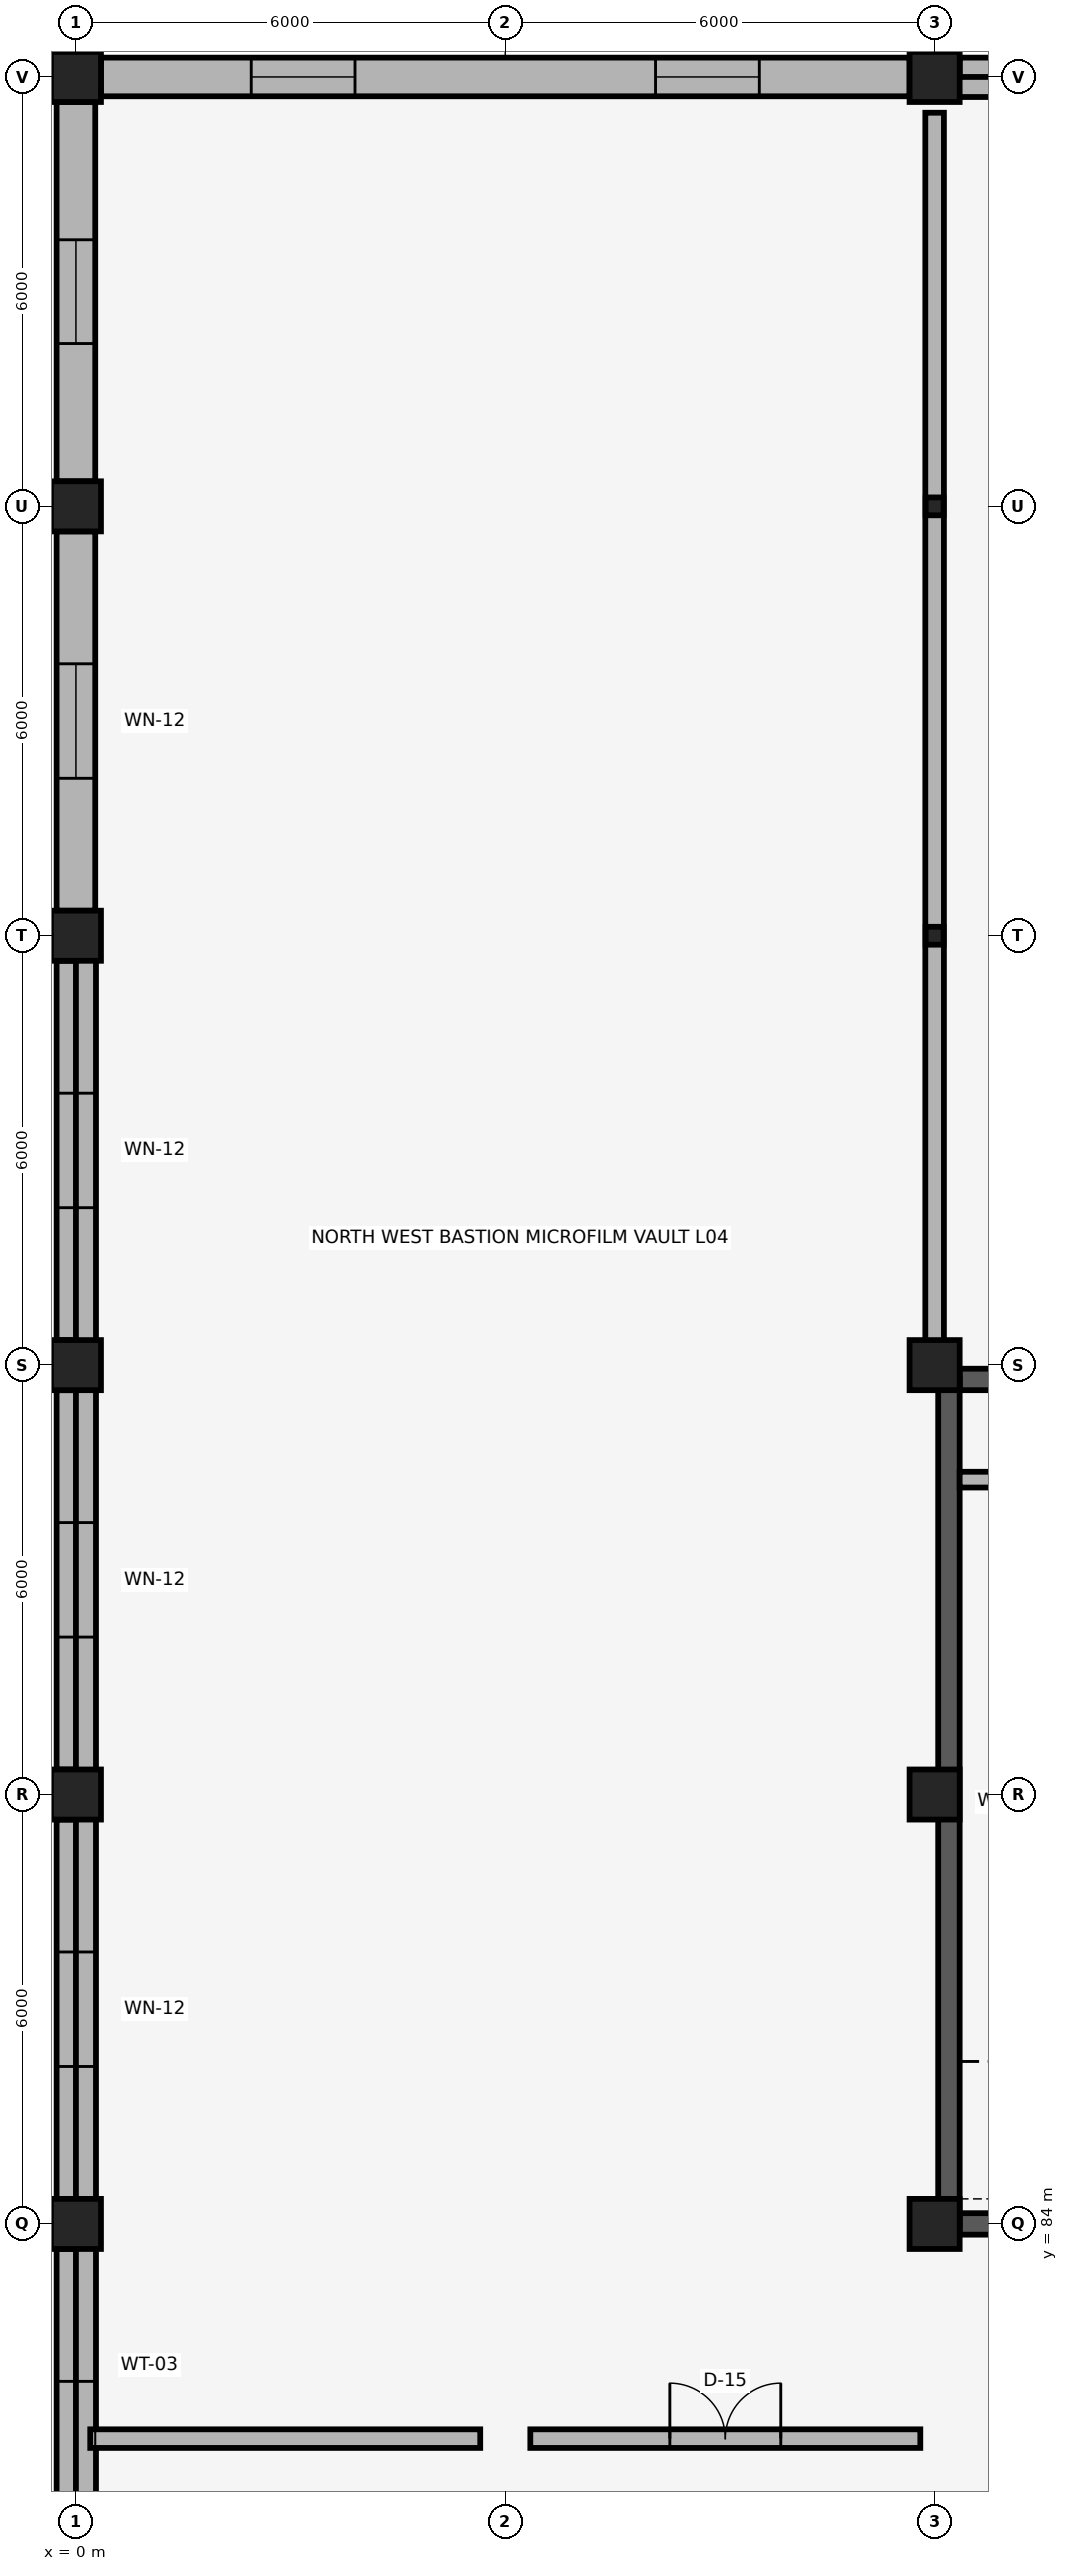
"""IFC4 building model, lengths in metres.
Left out: names, types, materials, properties, quantities, classifications, styles, units other than length and angle.
Written with IfcOpenShell. Run it as: python <this file> out.ifc"""

import sys

from ifc_helpers import new_model, si_unit, direction, frame, frame_2d, origin, origin_2d, place, context, subcontext, project, spatial, rectangle, i_section, extrude, element, fill, save


model = new_model("IFC4")
c1 = context("Model", 3, precision=1e-05, world=origin(), true_north=direction((0.0, 1.0)))
c2 = subcontext(c1, "Body", "Model", "MODEL_VIEW")
j1 = project(units=[si_unit("LENGTHUNIT", "METRE"), si_unit("PLANEANGLEUNIT", "RADIAN")], contexts=[c1])
p1 = place(None, origin())
s1 = spatial("IfcSite", under=j1, at=p1, CompositionType="ELEMENT")
p2 = place(p1, origin())
s2 = spatial("IfcBuilding", under=s1, at=p2, CompositionType="ELEMENT")
p3 = place(p2, frame((0.0, 0.0, 16.5)))
s3 = spatial("IfcBuildingStorey", under=s2, at=p3, CompositionType="ELEMENT", Elevation=16.5)
for number, where, z_axis, x_axis in (
    (1, (0.0, 84.0, 0.0), (0.0, 0.0, 1.0), (1.0, 0.0, 0.0)),
    (2, (12.0, 84.0, 0.0), (0.0, 0.0, 1.0), (1.0, 0.0, 0.0)),
    (3, (0.0, 90.0, 0.0), (0.0, 0.0, 1.0), (1.0, 0.0, 0.0)),
    (4, (12.0, 90.0, 0.0), (0.0, 0.0, 1.0), (1.0, 0.0, 0.0)),
    (5, (0.0, 96.0, 0.0), (0.0, 0.0, 1.0), (1.0, 0.0, 0.0)),
    (6, (12.0, 96.0, 0.0), (0.0, 0.0, 1.0), (1.0, 0.0, 0.0)),
    (7, (0.0, 102.0, 0.0), (0.0, 0.0, 1.0), (1.0, 0.0, 0.0)),
):
    element("IfcColumn", number, at=place(p3, frame(where, z_axis=z_axis, x_axis=x_axis)), inside=s3, PredefinedType="COLUMN", context=c2, shape_type="SweptSolid", body=[
        extrude(rectangle(XDim=0.7, YDim=0.7, at=origin_2d()), origin(), (0.0, 0.0, 1.0), 4.0),
    ])
p4 = place(p3, frame((12.0, 102.0, 0.0), z_axis=(0.0, 0.0, 1.0), x_axis=(1.0, 0.0, 0.0)))
e8 = element("IfcColumn", 8, at=p4, inside=s3, PredefinedType="COLUMN", context=c2, shape_type="SweptSolid", body=[
    extrude(i_section(OverallWidth=0.25, OverallDepth=0.25, WebThickness=0.009, FlangeThickness=0.014, FilletRadius=0.016, at=origin_2d()), origin(), (0.0, 0.0, 1.0), 4.0),
])
p5 = place(p3, frame((0.0, 108.0, 0.0), z_axis=(0.0, 0.0, 1.0), x_axis=(1.0, 0.0, 0.0)))
e9 = element("IfcColumn", 9, at=p5, inside=s3, PredefinedType="COLUMN", context=c2, shape_type="SweptSolid", body=[
    extrude(rectangle(XDim=0.7, YDim=0.7, at=origin_2d()), origin(), (0.0, 0.0, 1.0), 4.0),
])
p6 = place(p3, frame((12.0, 108.0, 0.0), z_axis=(0.0, 0.0, 1.0), x_axis=(1.0, 0.0, 0.0)))
e10 = element("IfcColumn", 10, at=p6, inside=s3, PredefinedType="COLUMN", context=c2, shape_type="SweptSolid", body=[
    extrude(i_section(OverallWidth=0.25, OverallDepth=0.25, WebThickness=0.009, FlangeThickness=0.014, FilletRadius=0.016, at=origin_2d()), origin(), (0.0, 0.0, 1.0), 4.0),
])
for number, where, z_axis, x_axis in (
    (11, (0.0, 114.0, 0.0), (0.0, 0.0, 1.0), (1.0, 0.0, 0.0)),
    (12, (12.0, 114.0, 0.0), (0.0, 0.0, 1.0), (1.0, 0.0, 0.0)),
):
    element("IfcColumn", number, at=place(p3, frame(where, z_axis=z_axis, x_axis=x_axis)), inside=s3, PredefinedType="COLUMN", context=c2, shape_type="SweptSolid", body=[
        extrude(rectangle(XDim=0.7, YDim=0.7, at=origin_2d()), origin(), (0.0, 0.0, 1.0), 4.0),
    ])
p7 = place(p3, frame((0.35, 114.0, 0.0), z_axis=(0.0, 0.0, 1.0), x_axis=(1.0, 0.0, 0.0)))
e13 = element("IfcWall", 13, at=p7, inside=s3, PredefinedType="SOLIDWALL", context=c2, shape_type="SweptSolid", body=[
    extrude(rectangle(XDim=11.3, YDim=0.54, at=frame_2d((5.65, 0.0))), origin(), (0.0, 0.0, 1.0), 3.55),
])
p8 = place(p7, frame((2.1, 0.0, 0.85)))
e14 = element("IfcOpeningElement", 14, at=p8, cuts=e13, PredefinedType="OPENING", context=c2, shape_type="SweptSolid", body=[
    extrude(rectangle(XDim=1.45, YDim=2.15, at=frame_2d((0.725, 1.075))), frame((0.0, 0.285, 0.0), z_axis=(0.0, -1.0, 0.0), x_axis=(1.0, 0.0, 0.0)), (0.0, 0.0, 1.0), 0.57),
])
p9 = place(p7, frame((7.75, 0.0, 0.85)))
e15 = element("IfcOpeningElement", 15, at=p9, cuts=e13, PredefinedType="OPENING", context=c2, shape_type="SweptSolid", body=[
    extrude(rectangle(XDim=1.45, YDim=2.15, at=frame_2d((0.725, 1.075))), frame((0.0, 0.285, 0.0), z_axis=(0.0, -1.0, 0.0), x_axis=(1.0, 0.0, 0.0)), (0.0, 0.0, 1.0), 0.57),
])
p10 = place(p3, frame((12.35, 114.0, 0.0), z_axis=(0.0, 0.0, 1.0), x_axis=(1.0, 0.0, 0.0)))
e16 = element("IfcWall", 16, at=p10, inside=s3, PredefinedType="SOLIDWALL", context=c2, shape_type="SweptSolid", body=[
    extrude(rectangle(XDim=5.3, YDim=0.54, at=frame_2d((2.65, 0.0))), origin(), (0.0, 0.0, 1.0), 3.55),
])
p11 = place(p3, frame((0.0, 78.35, 0.0), z_axis=(0.0, 0.0, 1.0), x_axis=(0.0, 1.0, 0.0)))
e17 = element("IfcWall", 17, at=p11, inside=s3, PredefinedType="SOLIDWALL", context=c2, shape_type="SweptSolid", body=[
    extrude(rectangle(XDim=5.3, YDim=0.54, at=frame_2d((2.65, 0.0))), origin(), (0.0, 0.0, 1.0), 3.55),
])
p12 = place(p11, frame((1.85, 0.0, 0.85)))
e18 = element("IfcOpeningElement", 18, at=p12, cuts=e17, PredefinedType="OPENING", context=c2, shape_type="SweptSolid", body=[
    extrude(rectangle(XDim=1.6, YDim=2.2, at=frame_2d((0.8, 1.1))), frame((0.0, 0.285, 0.0), z_axis=(0.0, -1.0, 0.0), x_axis=(1.0, 0.0, 0.0)), (0.0, 0.0, 1.0), 0.57),
])
p13 = place(p3, frame((0.0, 84.35, 0.0), z_axis=(0.0, 0.0, 1.0), x_axis=(0.0, 1.0, 0.0)))
e19 = element("IfcWall", 19, at=p13, inside=s3, PredefinedType="SOLIDWALL", context=c2, shape_type="SweptSolid", body=[
    extrude(rectangle(XDim=5.3, YDim=0.54, at=frame_2d((2.65, 0.0))), origin(), (0.0, 0.0, 1.0), 3.55),
])
p14 = place(p13, frame((1.85, 0.0, 0.85)))
e20 = element("IfcOpeningElement", 20, at=p14, cuts=e19, PredefinedType="OPENING", context=c2, shape_type="SweptSolid", body=[
    extrude(rectangle(XDim=1.6, YDim=2.2, at=frame_2d((0.8, 1.1))), frame((0.0, 0.285, 0.0), z_axis=(0.0, -1.0, 0.0), x_axis=(1.0, 0.0, 0.0)), (0.0, 0.0, 1.0), 0.57),
])
p15 = place(p3, frame((0.0, 90.35, 0.0), z_axis=(0.0, 0.0, 1.0), x_axis=(0.0, 1.0, 0.0)))
e21 = element("IfcWall", 21, at=p15, inside=s3, PredefinedType="SOLIDWALL", context=c2, shape_type="SweptSolid", body=[
    extrude(rectangle(XDim=5.3, YDim=0.54, at=frame_2d((2.65, 0.0))), origin(), (0.0, 0.0, 1.0), 3.55),
])
p16 = place(p15, frame((1.85, 0.0, 0.85)))
e22 = element("IfcOpeningElement", 22, at=p16, cuts=e21, PredefinedType="OPENING", context=c2, shape_type="SweptSolid", body=[
    extrude(rectangle(XDim=1.6, YDim=2.2, at=frame_2d((0.8, 1.1))), frame((0.0, 0.285, 0.0), z_axis=(0.0, -1.0, 0.0), x_axis=(1.0, 0.0, 0.0)), (0.0, 0.0, 1.0), 0.57),
])
p17 = place(p3, frame((0.0, 96.35, 0.0), z_axis=(0.0, 0.0, 1.0), x_axis=(0.0, 1.0, 0.0)))
e23 = element("IfcWall", 23, at=p17, inside=s3, PredefinedType="SOLIDWALL", context=c2, shape_type="SweptSolid", body=[
    extrude(rectangle(XDim=5.3, YDim=0.54, at=frame_2d((2.65, 0.0))), origin(), (0.0, 0.0, 1.0), 3.55),
])
p18 = place(p17, frame((1.85, 0.0, 0.85)))
e24 = element("IfcOpeningElement", 24, at=p18, cuts=e23, PredefinedType="OPENING", context=c2, shape_type="SweptSolid", body=[
    extrude(rectangle(XDim=1.6, YDim=2.2, at=frame_2d((0.8, 1.1))), frame((0.0, 0.285, 0.0), z_axis=(0.0, -1.0, 0.0), x_axis=(1.0, 0.0, 0.0)), (0.0, 0.0, 1.0), 0.57),
])
p19 = place(p3, frame((0.0, 102.35, 0.0), z_axis=(0.0, 0.0, 1.0), x_axis=(0.0, 1.0, 0.0)))
e25 = element("IfcWall", 25, at=p19, inside=s3, PredefinedType="SOLIDWALL", context=c2, shape_type="SweptSolid", body=[
    extrude(rectangle(XDim=5.3, YDim=0.54, at=frame_2d((2.65, 0.0))), origin(), (0.0, 0.0, 1.0), 3.55),
])
p20 = place(p19, frame((1.85, 0.0, 0.85)))
e26 = element("IfcOpeningElement", 26, at=p20, cuts=e25, PredefinedType="OPENING", context=c2, shape_type="SweptSolid", body=[
    extrude(rectangle(XDim=1.6, YDim=2.2, at=frame_2d((0.8, 1.1))), frame((0.0, 0.285, 0.0), z_axis=(0.0, -1.0, 0.0), x_axis=(1.0, 0.0, 0.0)), (0.0, 0.0, 1.0), 0.57),
])
p21 = place(p3, frame((0.0, 108.35, 0.0), z_axis=(0.0, 0.0, 1.0), x_axis=(0.0, 1.0, 0.0)))
e27 = element("IfcWall", 27, at=p21, inside=s3, PredefinedType="SOLIDWALL", context=c2, shape_type="SweptSolid", body=[
    extrude(rectangle(XDim=5.3, YDim=0.54, at=frame_2d((2.65, 0.0))), origin(), (0.0, 0.0, 1.0), 3.55),
])
p22 = place(p21, frame((1.925, 0.0, 0.85)))
e28 = element("IfcOpeningElement", 28, at=p22, cuts=e27, PredefinedType="OPENING", context=c2, shape_type="SweptSolid", body=[
    extrude(rectangle(XDim=1.45, YDim=2.15, at=frame_2d((0.725, 1.075))), frame((0.0, 0.285, 0.0), z_axis=(0.0, -1.0, 0.0), x_axis=(1.0, 0.0, 0.0)), (0.0, 0.0, 1.0), 0.57),
])
p23 = place(p3, frame((0.14, 12.0, 4.2), z_axis=(0.0, 0.0, 1.0), x_axis=(0.0, 1.0, 0.0)))
e29 = element("IfcWall", 29, at=p23, inside=s3, PredefinedType="PARAPET", context=c2, shape_type="SweptSolid", body=[
    extrude(rectangle(XDim=90.0, YDim=0.28, at=frame_2d((45.0, 0.0))), origin(), (0.0, 0.0, 1.0), 0.85),
])
p24 = place(p3, frame((12.0, 113.86, 4.2), z_axis=(0.0, 0.0, 1.0), x_axis=(1.0, 0.0, 0.0)))
e30 = element("IfcWall", 30, at=p24, inside=s3, PredefinedType="PARAPET", context=c2, shape_type="SweptSolid", body=[
    extrude(rectangle(XDim=144.0, YDim=0.28, at=frame_2d((72.0, 0.0))), origin(), (0.0, 0.0, 1.0), 0.85),
])
p25 = place(p3, frame((12.35, 84.0, 0.0), z_axis=(0.0, 0.0, 1.0), x_axis=(1.0, 0.0, 0.0)))
e31 = element("IfcWall", 31, at=p25, inside=s3, PredefinedType="SHEAR", context=c2, shape_type="SweptSolid", body=[
    extrude(rectangle(XDim=5.3, YDim=0.3, at=frame_2d((2.65, 0.0))), origin(), (0.0, 0.0, 1.0), 4.0),
])
p26 = place(p25, frame((1.925, 0.0, 0.0)))
e32 = element("IfcOpeningElement", 32, at=p26, cuts=e31, PredefinedType="OPENING", context=c2, shape_type="SweptSolid", body=[
    extrude(rectangle(XDim=1.45, YDim=2.25, at=frame_2d((0.725, 1.125))), frame((0.0, 0.165, 0.0), z_axis=(0.0, -1.0, 0.0), x_axis=(1.0, 0.0, 0.0)), (0.0, 0.0, 1.0), 0.33),
])
p27 = place(p3, frame((12.35, 95.8, 0.0), z_axis=(0.0, 0.0, 1.0), x_axis=(1.0, 0.0, 0.0)))
e33 = element("IfcWall", 33, at=p27, inside=s3, PredefinedType="SHEAR", context=c2, shape_type="SweptSolid", body=[
    extrude(rectangle(XDim=5.3, YDim=0.3, at=frame_2d((2.65, 0.0))), origin(), (0.0, 0.0, 1.0), 4.0),
])
p28 = place(p3, frame((12.2, 84.0, 0.0), z_axis=(0.0, 0.0, 1.0), x_axis=(0.0, 1.0, 0.0)))
e34 = element("IfcWall", 34, at=p28, inside=s3, PredefinedType="SHEAR", context=c2, shape_type="SweptSolid", body=[
    extrude(rectangle(XDim=11.8, YDim=0.3, at=frame_2d((5.9, 0.0))), origin(), (0.0, 0.0, 1.0), 4.0),
])
p29 = place(p3, frame((12.35, 94.4, 0.0), z_axis=(0.0, 0.0, 1.0), x_axis=(1.0, 0.0, 0.0)))
e35 = element("IfcWall", 35, at=p29, inside=s3, PredefinedType="PARTITIONING", context=c2, shape_type="SweptSolid", body=[
    extrude(rectangle(XDim=1.1, YDim=0.22, at=frame_2d((0.55, 0.0))), origin(), (0.0, 0.0, 1.0), 4.0),
])
p30 = place(p3, frame((6.35, 81.0, 0.0), z_axis=(0.0, 0.0, 1.0), x_axis=(1.0, 0.0, 0.0)))
e36 = element("IfcWall", 36, at=p30, inside=s3, PredefinedType="PARTITIONING", context=c2, shape_type="SweptSolid", body=[
    extrude(rectangle(XDim=5.45, YDim=0.26, at=frame_2d((2.725, 0.0))), origin(), (0.0, 0.0, 1.0), 4.0),
])
p31 = place(p30, frame((1.95, 0.0, 0.0)))
e37 = element("IfcOpeningElement", 37, at=p31, cuts=e36, PredefinedType="OPENING", context=c2, shape_type="SweptSolid", body=[
    extrude(rectangle(XDim=1.55, YDim=2.3, at=frame_2d((0.775, 1.15))), frame((0.0, 0.145, 0.0), z_axis=(0.0, -1.0, 0.0), x_axis=(1.0, 0.0, 0.0)), (0.0, 0.0, 1.0), 0.29),
])
p32 = place(p3, frame((0.2, 81.0, 0.0), z_axis=(0.0, 0.0, 1.0), x_axis=(1.0, 0.0, 0.0)))
e38 = element("IfcWall", 38, at=p32, inside=s3, PredefinedType="PARTITIONING", context=c2, shape_type="SweptSolid", body=[
    extrude(rectangle(XDim=5.45, YDim=0.26, at=frame_2d((2.725, 0.0))), origin(), (0.0, 0.0, 1.0), 4.0),
])
p33 = place(p3, frame((12.0, 96.2, 0.0), z_axis=(0.0, 0.0, 1.0), x_axis=(0.0, 1.0, 0.0)))
e39 = element("IfcWall", 39, at=p33, inside=s3, PredefinedType="PARTITIONING", context=c2, shape_type="SweptSolid", body=[
    extrude(rectangle(XDim=17.3, YDim=0.26, at=frame_2d((8.65, 0.0))), origin(), (0.0, 0.0, 1.0), 3.56),
])
p34 = place(p8, origin())
e40 = element("IfcWindow", 40, at=p34, inside=s3, PartitioningType="SINGLE_PANEL", PredefinedType="WINDOW", context=c2, shape_type="SweptSolid", body=[
    extrude(rectangle(XDim=1.45, YDim=2.15, at=frame_2d((0.725, 1.075))), frame((0.0, 0.03, 0.0), z_axis=(0.0, -1.0, 0.0), x_axis=(1.0, 0.0, 0.0)), (0.0, 0.0, 1.0), 0.06),
])
fill(e14, e40)
p35 = place(p9, origin())
e41 = element("IfcWindow", 41, at=p35, inside=s3, PartitioningType="SINGLE_PANEL", PredefinedType="WINDOW", context=c2, shape_type="SweptSolid", body=[
    extrude(rectangle(XDim=1.45, YDim=2.15, at=frame_2d((0.725, 1.075))), frame((0.0, 0.03, 0.0), z_axis=(0.0, -1.0, 0.0), x_axis=(1.0, 0.0, 0.0)), (0.0, 0.0, 1.0), 0.06),
])
fill(e15, e41)
p36 = place(p12, origin())
e42 = element("IfcWindow", 42, at=p36, inside=s3, PartitioningType="SINGLE_PANEL", PredefinedType="WINDOW", context=c2, shape_type="SweptSolid", body=[
    extrude(rectangle(XDim=1.6, YDim=2.2, at=frame_2d((0.8, 1.1))), frame((0.0, 0.03, 0.0), z_axis=(0.0, -1.0, 0.0), x_axis=(1.0, 0.0, 0.0)), (0.0, 0.0, 1.0), 0.06),
])
fill(e18, e42)
p37 = place(p14, origin())
e43 = element("IfcWindow", 43, at=p37, inside=s3, PartitioningType="SINGLE_PANEL", PredefinedType="WINDOW", context=c2, shape_type="SweptSolid", body=[
    extrude(rectangle(XDim=1.6, YDim=2.2, at=frame_2d((0.8, 1.1))), frame((0.0, 0.03, 0.0), z_axis=(0.0, -1.0, 0.0), x_axis=(1.0, 0.0, 0.0)), (0.0, 0.0, 1.0), 0.06),
])
fill(e20, e43)
p38 = place(p16, origin())
e44 = element("IfcWindow", 44, at=p38, inside=s3, PartitioningType="SINGLE_PANEL", PredefinedType="WINDOW", context=c2, shape_type="SweptSolid", body=[
    extrude(rectangle(XDim=1.6, YDim=2.2, at=frame_2d((0.8, 1.1))), frame((0.0, 0.03, 0.0), z_axis=(0.0, -1.0, 0.0), x_axis=(1.0, 0.0, 0.0)), (0.0, 0.0, 1.0), 0.06),
])
fill(e22, e44)
p39 = place(p18, origin())
e45 = element("IfcWindow", 45, at=p39, inside=s3, PartitioningType="SINGLE_PANEL", PredefinedType="WINDOW", context=c2, shape_type="SweptSolid", body=[
    extrude(rectangle(XDim=1.6, YDim=2.2, at=frame_2d((0.8, 1.1))), frame((0.0, 0.03, 0.0), z_axis=(0.0, -1.0, 0.0), x_axis=(1.0, 0.0, 0.0)), (0.0, 0.0, 1.0), 0.06),
])
fill(e24, e45)
p40 = place(p20, origin())
e46 = element("IfcWindow", 46, at=p40, inside=s3, PartitioningType="SINGLE_PANEL", PredefinedType="WINDOW", context=c2, shape_type="SweptSolid", body=[
    extrude(rectangle(XDim=1.6, YDim=2.2, at=frame_2d((0.8, 1.1))), frame((0.0, 0.03, 0.0), z_axis=(0.0, -1.0, 0.0), x_axis=(1.0, 0.0, 0.0)), (0.0, 0.0, 1.0), 0.06),
])
fill(e26, e46)
p41 = place(p22, origin())
e47 = element("IfcWindow", 47, at=p41, inside=s3, PartitioningType="SINGLE_PANEL", PredefinedType="WINDOW", context=c2, shape_type="SweptSolid", body=[
    extrude(rectangle(XDim=1.45, YDim=2.15, at=frame_2d((0.725, 1.075))), frame((0.0, 0.03, 0.0), z_axis=(0.0, -1.0, 0.0), x_axis=(1.0, 0.0, 0.0)), (0.0, 0.0, 1.0), 0.06),
])
fill(e28, e47)
p42 = place(p31, origin())
e48 = element("IfcDoor", 48, at=p42, inside=s3, OperationType="DOUBLE_DOOR_SINGLE_SWING", PredefinedType="DOOR", context=c2, shape_type="SweptSolid", body=[
    extrude(rectangle(XDim=1.55, YDim=2.3, at=frame_2d((0.775, 1.15))), frame((0.0, 0.025, 0.0), z_axis=(0.0, -1.0, 0.0), x_axis=(1.0, 0.0, 0.0)), (0.0, 0.0, 1.0), 0.05),
])
fill(e37, e48)
save(model, sys.argv[1])
